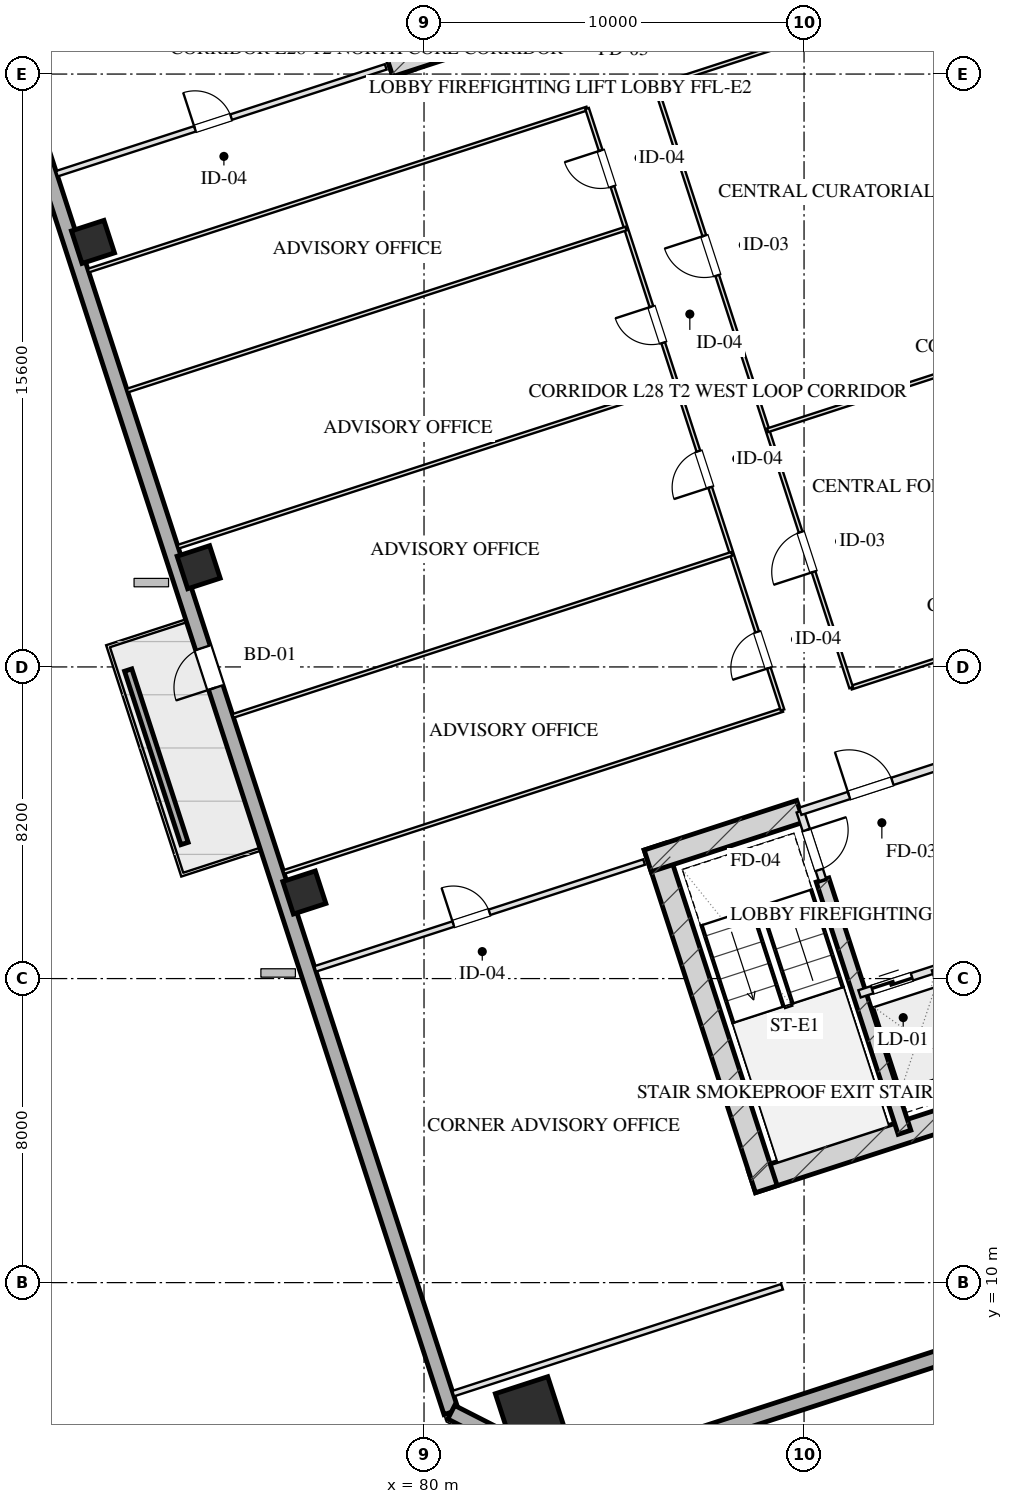
"""IFC4 building model, lengths in metres.
Left out: names, types, materials, properties, quantities, classifications, styles, units other than length and angle.
Written with IfcOpenShell. Run it as: python <this file> out.ifc"""

import sys

from ifc_helpers import new_model, si_unit, direction, frame, frame_2d, origin, origin_2d, place, context, subcontext, project, spatial, rectangle, hollow_rectangle, extrude, element, fill, save


model = new_model("IFC4")
c1 = context("Model", 3, precision=1e-05, world=origin(), true_north=direction((0.0, 1.0)))
c2 = subcontext(c1, "Body", "Model", "MODEL_VIEW")
j1 = project(units=[si_unit("LENGTHUNIT", "METRE"), si_unit("PLANEANGLEUNIT", "RADIAN")], contexts=[c1])
p1 = place(None, origin())
s1 = spatial("IfcSite", under=j1, at=p1, CompositionType="ELEMENT")
p2 = place(p1, origin())
s2 = spatial("IfcBuilding", under=s1, at=p2, CompositionType="ELEMENT")
p3 = place(p2, frame((0.0, 0.0, 110.4)))
s3 = spatial("IfcBuildingStorey", under=s2, at=p3, CompositionType="ELEMENT", Elevation=110.4)
p4 = place(p3, frame((88.63, 12.652, 0.0), z_axis=(0.0, 0.0, 1.0), x_axis=(0.95105714907, 0.309015046886, 0.0)))
e1 = element("IfcWall", 1, at=p4, inside=s3, PredefinedType="SHEAR", context=c2, shape_type="SweptSolid", body=[
    extrude(rectangle(XDim=16.4, YDim=0.6, at=frame_2d((8.2, 0.0))), origin(), (0.0, 0.0, 1.0), 3.45),
])
p5 = place(p3, frame((86.078, 21.475, 0.0), z_axis=(0.0, 0.0, 1.0), x_axis=(0.309017938678, -0.951056209472, 0.0)))
e2 = element("IfcWall", 2, at=p5, inside=s3, PredefinedType="SHEAR", context=c2, shape_type="SweptSolid", body=[
    extrude(rectangle(XDim=9.48, YDim=0.6, at=frame_2d((4.74, 0.0))), origin(), (0.0, 0.0, 1.0), 3.45),
])
p6 = place(p3, frame((90.486, 20.594, 0.0), z_axis=(0.0, 0.0, 1.0), x_axis=(0.309020428229, -0.951055400562, 0.0)))
e3 = element("IfcWall", 3, at=p6, inside=s3, PredefinedType="SHEAR", context=c2, shape_type="SweptSolid", body=[
    extrude(rectangle(XDim=6.98, YDim=0.35, at=frame_2d((3.49, 0.0))), origin(), (0.0, 0.0, 1.0), 3.45),
])
p7 = place(p3, frame((85.886, 21.097, 0.0), z_axis=(0.0, 0.0, 1.0), x_axis=(0.951068073652, 0.308981422225, 0.0)))
e4 = element("IfcWall", 4, at=p7, inside=s3, PredefinedType="SHEAR", context=c2, shape_type="SweptSolid", body=[
    extrude(rectangle(XDim=4.22, YDim=0.6, at=frame_2d((2.11, 0.0))), origin(), (0.0, 0.0, 1.0), 3.45),
])
p8 = place(p3, frame((79.466, 41.828, 0.0), z_axis=(0.0, 0.0, 1.0), x_axis=(-0.309041232772, 0.951048640421, 0.0)))
e5 = element("IfcWall", 5, at=p8, inside=s3, PredefinedType="SHEAR", context=c2, shape_type="SweptSolid", body=[
    extrude(rectangle(XDim=9.48, YDim=0.6, at=frame_2d((4.74, 0.0))), origin(), (0.0, 0.0, 1.0), 3.45),
])
p9 = place(p3, frame((79.087, 42.021, 0.0), z_axis=(0.0, 0.0, 1.0), x_axis=(0.951062550203, 0.3089984233, 0.0)))
e6 = element("IfcWall", 6, at=p9, inside=s3, PredefinedType="SHEAR", context=c2, shape_type="SweptSolid", body=[
    extrude(rectangle(XDim=4.22, YDim=0.6, at=frame_2d((2.11, 0.0))), origin(), (0.0, 0.0, 1.0), 3.45),
])
p10 = place(p3, frame((82.791, 6.612, 0.0), z_axis=(0.0, 0.0, 1.0), x_axis=(0.951056516295, 0.309016994375, 0.0)))
e7 = element("IfcColumn", 7, at=p10, inside=s3, PredefinedType="COLUMN", context=c2, shape_type="SweptSolid", body=[
    extrude(hollow_rectangle(XDim=1.45, YDim=1.45, WallThickness=0.05, at=origin_2d()), origin(), (0.0, 0.0, 1.0), 3.451),
])
for number, where, z_axis, x_axis in (
    (8, (76.851, 20.264, 0.0), (0.0, 0.0, 1.0), (0.951, 0.309, 0.0)),
    (9, (74.07, 28.824, 0.0), (0.0, 0.0, 1.0), (0.951, 0.309, 0.0)),
    (10, (71.289, 37.384, 0.0), (0.0, 0.0, 1.0), (0.951, 0.309, 0.0)),
):
    element("IfcColumn", number, at=place(p3, frame(where, z_axis=z_axis, x_axis=x_axis)), inside=s3, PredefinedType="COLUMN", context=c2, shape_type="SweptSolid", body=[
        extrude(hollow_rectangle(XDim=0.9, YDim=0.9, WallThickness=0.032, at=origin_2d()), origin(), (0.0, 0.0, 1.0), 3.451),
    ])
p11 = place(p3, frame((80.716, 6.59, 0.0), z_axis=(0.0, 0.0, 1.0), x_axis=(-0.309017542002, 0.95105633836, 0.0)))
e11 = element("IfcWall", 11, at=p11, inside=s3, PredefinedType="SOLIDWALL", context=c2, shape_type="SweptSolid", body=[
    extrude(rectangle(XDim=46.4, YDim=0.4, at=frame_2d((23.2, 0.0))), origin(), (0.0, 0.0, 1.0), 2.61),
])
p12 = place(p11, frame((20.05, 0.0, 0.0)))
e12 = element("IfcOpeningElement", 12, at=p12, cuts=e11, PredefinedType="OPENING", context=c2, shape_type="SweptSolid", body=[
    extrude(rectangle(XDim=1.1, YDim=2.15, at=frame_2d((0.55, 1.075))), frame((0.0, 0.21, 0.0), z_axis=(0.0, -1.0, 0.0), x_axis=(1.0, 0.0, 0.0)), (0.0, 0.0, 1.0), 0.42),
])
p13 = place(p3, frame((111.953, 14.005, 0.0), z_axis=(0.0, 0.0, 1.0), x_axis=(-0.95105505922, -0.309021478754, 0.0)))
e13 = element("IfcWall", 13, at=p13, inside=s3, PredefinedType="SOLIDWALL", context=c2, shape_type="SweptSolid", body=[
    extrude(rectangle(XDim=29.4, YDim=0.4, at=frame_2d((14.7, 0.0))), origin(), (0.0, 0.0, 1.0), 2.61),
])
p14 = place(p3, frame((83.992, 4.92, 0.0), z_axis=(0.0, 0.0, 1.0), x_axis=(-0.891001999643, 0.45399937955, 0.0)))
e14 = element("IfcWall", 14, at=p14, inside=s3, PredefinedType="SOLIDWALL", context=c2, shape_type="SweptSolid", body=[
    extrude(rectangle(XDim=3.677, YDim=0.4, at=frame_2d((1.839, 0.0))), origin(), (0.0, 0.0, 1.0), 2.61),
])
p15 = place(p3, frame((73.698, 21.553, 0.0), z_axis=(0.0, 0.0, 1.0), x_axis=(-0.309032019345, 0.951051634255, 0.0)))
e15 = element("IfcWall", 15, at=p15, inside=s3, PredefinedType="PARAPET", context=c2, shape_type="SweptSolid", body=[
    extrude(rectangle(XDim=4.8, YDim=0.2, at=frame_2d((2.4, 0.0))), origin(), (0.0, 0.0, 1.0), 0.75),
])
p16 = place(p3, frame((89.899, 22.401, 0.0), z_axis=(0.0, 0.0, 1.0), x_axis=(0.308932062672, -0.951084108086, 0.0)))
e16 = element("IfcWall", 16, at=p16, inside=s3, PredefinedType="PARTITIONING", context=c2, shape_type="SweptSolid", body=[
    extrude(rectangle(XDim=1.9, YDim=0.2, at=frame_2d((0.95, 0.0))), origin(), (0.0, 0.0, 1.0), 3.175),
])
p17 = place(p16, frame((0.52, 0.0, 0.0)))
e17 = element("IfcOpeningElement", 17, at=p17, cuts=e16, PredefinedType="OPENING", context=c2, shape_type="SweptSolid", body=[
    extrude(rectangle(XDim=1.1, YDim=2.05, at=frame_2d((0.55, 1.025))), frame((0.0, 0.11, 0.0), z_axis=(0.0, -1.0, 0.0), x_axis=(1.0, 0.0, 0.0)), (0.0, 0.0, 1.0), 0.22),
])
p18 = place(p3, frame((89.899, 22.401, 0.0), z_axis=(0.0, 0.0, 1.0), x_axis=(0.951046716504, 0.309047153403, 0.0)))
e18 = element("IfcWall", 18, at=p18, inside=s3, PredefinedType="PARTITIONING", context=c2, shape_type="SweptSolid", body=[
    extrude(rectangle(XDim=3.83, YDim=0.2, at=frame_2d((1.915, 0.0))), origin(), (0.0, 0.0, 1.0), 3.175),
])
p19 = place(p18, frame((1.35, 0.0, 0.0)))
e19 = element("IfcOpeningElement", 19, at=p19, cuts=e18, PredefinedType="OPENING", context=c2, shape_type="SweptSolid", body=[
    extrude(rectangle(XDim=1.2, YDim=2.05, at=frame_2d((0.6, 1.025))), frame((0.0, 0.11, 0.0), z_axis=(0.0, -1.0, 0.0), x_axis=(1.0, 0.0, 0.0)), (0.0, 0.0, 1.0), 0.22),
])
p20 = place(p3, frame((91.46, 17.598, 0.0), z_axis=(0.0, 0.0, 1.0), x_axis=(0.951062257173, 0.308999325213, 0.0)))
e20 = element("IfcWall", 20, at=p20, inside=s3, PredefinedType="PARTITIONING", context=c2, shape_type="SweptSolid", body=[
    extrude(rectangle(XDim=2.1, YDim=0.2, at=frame_2d((1.05, 0.0))), origin(), (0.0, 0.0, 1.0), 3.175),
])
p21 = place(p20, frame((0.35, 0.0, 0.0)))
e21 = element("IfcOpeningElement", 21, at=p21, cuts=e20, PredefinedType="OPENING", context=c2, shape_type="SweptSolid", body=[
    extrude(rectangle(XDim=1.1, YDim=2.05, at=frame_2d((0.55, 1.025))), frame((0.0, 0.11, 0.0), z_axis=(0.0, -1.0, 0.0), x_axis=(1.0, 0.0, 0.0)), (0.0, 0.0, 1.0), 0.22),
])
p22 = place(p3, frame((93.457, 18.247, 0.0), z_axis=(0.0, 0.0, 1.0), x_axis=(0.3089935693, -0.951064127245, 0.0)))
e22 = element("IfcWall", 22, at=p22, inside=s3, PredefinedType="PARTITIONING", context=c2, shape_type="SweptSolid", body=[
    extrude(rectangle(XDim=3.7, YDim=0.2, at=frame_2d((1.85, 0.0))), origin(), (0.0, 0.0, 1.0), 3.175),
])
p23 = place(p3, frame((80.767, 7.079, 0.0), z_axis=(0.0, 0.0, 1.0), x_axis=(0.951057133767, 0.309015093986, 0.0)))
e23 = element("IfcWall", 23, at=p23, inside=s3, PredefinedType="PARTITIONING", context=c2, shape_type="SweptSolid", body=[
    extrude(rectangle(XDim=9.1, YDim=0.15, at=frame_2d((4.55, 0.0))), origin(), (0.0, 0.0, 1.0), 3.175),
])
p24 = place(p3, frame((77.136, 18.254, 0.0), z_axis=(0.0, 0.0, 1.0), x_axis=(0.951057133767, 0.309015093986, 0.0)))
e24 = element("IfcWall", 24, at=p24, inside=s3, PredefinedType="PARTITIONING", context=c2, shape_type="SweptSolid", body=[
    extrude(rectangle(XDim=9.1, YDim=0.15, at=frame_2d((4.55, 0.0))), origin(), (0.0, 0.0, 1.0), 3.175),
])
p25 = place(p24, frame((3.822, 0.0, 0.0)))
e25 = element("IfcOpeningElement", 25, at=p25, cuts=e24, PredefinedType="OPENING", context=c2, shape_type="SweptSolid", body=[
    extrude(rectangle(XDim=1.0, YDim=2.05, at=frame_2d((0.5, 1.025))), frame((0.0, 0.085, 0.0), z_axis=(0.0, -1.0, 0.0), x_axis=(1.0, 0.0, 0.0)), (0.0, 0.0, 1.0), 0.17),
])
p26 = place(p3, frame((70.338, 39.177, 0.0), z_axis=(0.0, 0.0, 1.0), x_axis=(0.951059695568, 0.309007209409, 0.0)))
e26 = element("IfcWall", 26, at=p26, inside=s3, PredefinedType="PARTITIONING", context=c2, shape_type="SweptSolid", body=[
    extrude(rectangle(XDim=9.1, YDim=0.15, at=frame_2d((4.55, 0.0))), origin(), (0.0, 0.0, 1.0), 3.175),
])
p27 = place(p26, frame((3.822, 0.0, 0.0)))
e27 = element("IfcOpeningElement", 27, at=p27, cuts=e26, PredefinedType="OPENING", context=c2, shape_type="SweptSolid", body=[
    extrude(rectangle(XDim=1.0, YDim=2.05, at=frame_2d((0.5, 1.025))), frame((0.0, 0.085, 0.0), z_axis=(0.0, -1.0, 0.0), x_axis=(1.0, 0.0, 0.0)), (0.0, 0.0, 1.0), 0.17),
])
p28 = place(p3, frame((76.308, 20.803, 0.0), z_axis=(0.0, 0.0, 1.0), x_axis=(0.951058377365, 0.309011266531, 0.0)))
e28 = element("IfcWall", 28, at=p28, inside=s3, PredefinedType="MOVABLE", context=c2, shape_type="SweptSolid", body=[
    extrude(rectangle(XDim=13.8, YDim=0.1, at=frame_2d((6.9, 0.0))), origin(), (0.0, 0.0, 1.0), 3.175),
])
p29 = place(p3, frame((91.24, 25.655, 0.0), z_axis=(0.0, 0.0, 1.0), x_axis=(0.951060182336, 0.309005711233, 0.0)))
e29 = element("IfcWall", 29, at=p29, inside=s3, PredefinedType="MOVABLE", context=c2, shape_type="SweptSolid", body=[
    extrude(rectangle(XDim=7.9, YDim=0.1, at=frame_2d((3.95, 0.0))), origin(), (0.0, 0.0, 1.0), 3.175),
])
p30 = place(p3, frame((71.166, 36.629, 0.0), z_axis=(0.0, 0.0, 1.0), x_axis=(0.951056688031, 0.309016465825, 0.0)))
e30 = element("IfcWall", 30, at=p30, inside=s3, PredefinedType="MOVABLE", context=c2, shape_type="SweptSolid", body=[
    extrude(rectangle(XDim=13.8, YDim=0.1, at=frame_2d((6.9, 0.0))), origin(), (0.0, 0.0, 1.0), 3.175),
])
p31 = place(p3, frame((86.097, 41.48, 0.0), z_axis=(0.0, 0.0, 1.0), x_axis=(0.951060182336, 0.309005711233, 0.0)))
e31 = element("IfcWall", 31, at=p31, inside=s3, PredefinedType="MOVABLE", context=c2, shape_type="SweptSolid", body=[
    extrude(rectangle(XDim=7.9, YDim=0.1, at=frame_2d((3.95, 0.0))), origin(), (0.0, 0.0, 1.0), 3.175),
])
p32 = place(p3, frame((89.433, 25.067, 0.0), z_axis=(0.0, 0.0, 1.0), x_axis=(-0.30901773025, 0.951056277195, 0.0)))
e32 = element("IfcWall", 32, at=p32, inside=s3, PredefinedType="MOVABLE", context=c2, shape_type="SweptSolid", body=[
    extrude(rectangle(XDim=16.64, YDim=0.1, at=frame_2d((8.32, 0.0))), origin(), (0.0, 0.0, 1.0), 3.175),
])
p33 = place(p32, frame((1.16, 0.0, 0.0)))
e33 = element("IfcOpeningElement", 33, at=p33, cuts=e32, PredefinedType="OPENING", context=c2, shape_type="SweptSolid", body=[
    extrude(rectangle(XDim=1.0, YDim=2.05, at=frame_2d((0.5, 1.025))), frame((0.0, 0.06, 0.0), z_axis=(0.0, -1.0, 0.0), x_axis=(1.0, 0.0, 0.0)), (0.0, 0.0, 1.0), 0.12),
])
p34 = place(p32, frame((6.16, 0.0, 0.0)))
e34 = element("IfcOpeningElement", 34, at=p34, cuts=e32, PredefinedType="OPENING", context=c2, shape_type="SweptSolid", body=[
    extrude(rectangle(XDim=1.0, YDim=2.05, at=frame_2d((0.5, 1.025))), frame((0.0, 0.06, 0.0), z_axis=(0.0, -1.0, 0.0), x_axis=(1.0, 0.0, 0.0)), (0.0, 0.0, 1.0), 0.12),
])
p35 = place(p32, frame((10.16, 0.0, 0.0)))
e35 = element("IfcOpeningElement", 35, at=p35, cuts=e32, PredefinedType="OPENING", context=c2, shape_type="SweptSolid", body=[
    extrude(rectangle(XDim=1.0, YDim=2.05, at=frame_2d((0.5, 1.025))), frame((0.0, 0.06, 0.0), z_axis=(0.0, -1.0, 0.0), x_axis=(1.0, 0.0, 0.0)), (0.0, 0.0, 1.0), 0.12),
])
p36 = place(p32, frame((14.48, 0.0, 0.0)))
e36 = element("IfcOpeningElement", 36, at=p36, cuts=e32, PredefinedType="OPENING", context=c2, shape_type="SweptSolid", body=[
    extrude(rectangle(XDim=1.0, YDim=2.05, at=frame_2d((0.5, 1.025))), frame((0.0, 0.06, 0.0), z_axis=(0.0, -1.0, 0.0), x_axis=(1.0, 0.0, 0.0)), (0.0, 0.0, 1.0), 0.12),
])
p37 = place(p3, frame((91.24, 25.655, 0.0), z_axis=(0.0, 0.0, 1.0), x_axis=(-0.30901773025, 0.951056277195, 0.0)))
e37 = element("IfcWall", 37, at=p37, inside=s3, PredefinedType="MOVABLE", context=c2, shape_type="SweptSolid", body=[
    extrude(rectangle(XDim=16.64, YDim=0.1, at=frame_2d((8.32, 0.0))), origin(), (0.0, 0.0, 1.0), 3.175),
])
p38 = place(p37, frame((3.204, 0.0, 0.0)))
e38 = element("IfcOpeningElement", 38, at=p38, cuts=e37, PredefinedType="OPENING", context=c2, shape_type="SweptSolid", body=[
    extrude(rectangle(XDim=1.1, YDim=2.05, at=frame_2d((0.55, 1.025))), frame((0.0, 0.06, 0.0), z_axis=(0.0, -1.0, 0.0), x_axis=(1.0, 0.0, 0.0)), (0.0, 0.0, 1.0), 0.12),
])
p39 = place(p37, frame((11.404, 0.0, 0.0)))
e39 = element("IfcOpeningElement", 39, at=p39, cuts=e37, PredefinedType="OPENING", context=c2, shape_type="SweptSolid", body=[
    extrude(rectangle(XDim=1.1, YDim=2.05, at=frame_2d((0.55, 1.025))), frame((0.0, 0.06, 0.0), z_axis=(0.0, -1.0, 0.0), x_axis=(1.0, 0.0, 0.0)), (0.0, 0.0, 1.0), 0.12),
])
p40 = place(p3, frame((89.039, 32.426, 0.0), z_axis=(0.0, 0.0, 1.0), x_axis=(0.951051099951, 0.309033663672, 0.0)))
e40 = element("IfcWall", 40, at=p40, inside=s3, PredefinedType="MOVABLE", context=c2, shape_type="SweptSolid", body=[
    extrude(rectangle(XDim=7.9, YDim=0.1, at=frame_2d((3.95, 0.0))), origin(), (0.0, 0.0, 1.0), 3.175),
])
p41 = place(p3, frame((74.973, 24.912, 0.0), z_axis=(0.0, 0.0, 1.0), x_axis=(0.951058377365, 0.309011266531, 0.0)))
e41 = element("IfcWall", 41, at=p41, inside=s3, PredefinedType="MOVABLE", context=c2, shape_type="SweptSolid", body=[
    extrude(rectangle(XDim=13.8, YDim=0.1, at=frame_2d((6.9, 0.0))), origin(), (0.0, 0.0, 1.0), 3.175),
])
for number, where, z_axis, x_axis in (
    (42, (73.527, 29.363, 0.0), (0.0, 0.0, 1.0), (0.951, 0.309, 0.0)),
    (43, (72.192, 33.471, 0.0), (0.0, 0.0, 1.0), (0.951, 0.309, 0.0)),
):
    element("IfcWall", number, at=place(p3, frame(where, z_axis=z_axis, x_axis=x_axis)), inside=s3, PredefinedType="MOVABLE", context=c2, shape_type="SweptSolid", body=[
        extrude(rectangle(XDim=13.8, YDim=0.1, at=frame_2d((6.9, 0.0))), origin(), (0.0, 0.0, 1.0), 3.175),
    ])
p42 = place(p12, origin())
e44 = element("IfcDoor", 44, at=p42, inside=s3, OperationType="SINGLE_SWING_LEFT", PredefinedType="DOOR", context=c2, shape_type="SweptSolid", body=[
    extrude(rectangle(XDim=1.1, YDim=2.15, at=frame_2d((0.55, 1.075))), frame((0.0, 0.025, 0.0), z_axis=(0.0, -1.0, 0.0), x_axis=(1.0, 0.0, 0.0)), (0.0, 0.0, 1.0), 0.05),
])
fill(e12, e44)
p43 = place(p17, origin())
e45 = element("IfcDoor", 45, at=p43, inside=s3, OperationType="SINGLE_SWING_LEFT", PredefinedType="DOOR", context=c2, shape_type="SweptSolid", body=[
    extrude(rectangle(XDim=1.1, YDim=2.05, at=frame_2d((0.55, 1.025))), frame((0.0, 0.025, 0.0), z_axis=(0.0, -1.0, 0.0), x_axis=(1.0, 0.0, 0.0)), (0.0, 0.0, 1.0), 0.05),
])
fill(e17, e45)
p44 = place(p19, origin())
e46 = element("IfcDoor", 46, at=p44, inside=s3, OperationType="SINGLE_SWING_LEFT", PredefinedType="DOOR", context=c2, shape_type="SweptSolid", body=[
    extrude(rectangle(XDim=1.2, YDim=2.05, at=frame_2d((0.6, 1.025))), frame((0.0, 0.025, 0.0), z_axis=(0.0, -1.0, 0.0), x_axis=(1.0, 0.0, 0.0)), (0.0, 0.0, 1.0), 0.05),
])
fill(e19, e46)
p45 = place(p21, origin())
e47 = element("IfcDoor", 47, at=p45, inside=s3, OperationType="DOUBLE_DOOR_SLIDING", PredefinedType="DOOR", context=c2, shape_type="SweptSolid", body=[
    extrude(rectangle(XDim=1.1, YDim=2.05, at=frame_2d((0.55, 1.025))), frame((0.0, 0.025, 0.0), z_axis=(0.0, -1.0, 0.0), x_axis=(1.0, 0.0, 0.0)), (0.0, 0.0, 1.0), 0.05),
])
fill(e21, e47)
p46 = place(p25, origin())
e48 = element("IfcDoor", 48, at=p46, inside=s3, OperationType="SINGLE_SWING_LEFT", PredefinedType="DOOR", context=c2, shape_type="SweptSolid", body=[
    extrude(rectangle(XDim=1.0, YDim=2.05, at=frame_2d((0.5, 1.025))), frame((0.0, 0.025, 0.0), z_axis=(0.0, -1.0, 0.0), x_axis=(1.0, 0.0, 0.0)), (0.0, 0.0, 1.0), 0.05),
])
fill(e25, e48)
p47 = place(p27, origin())
e49 = element("IfcDoor", 49, at=p47, inside=s3, OperationType="SINGLE_SWING_LEFT", PredefinedType="DOOR", context=c2, shape_type="SweptSolid", body=[
    extrude(rectangle(XDim=1.0, YDim=2.05, at=frame_2d((0.5, 1.025))), frame((0.0, 0.025, 0.0), z_axis=(0.0, -1.0, 0.0), x_axis=(1.0, 0.0, 0.0)), (0.0, 0.0, 1.0), 0.05),
])
fill(e27, e49)
p48 = place(p33, origin())
e50 = element("IfcDoor", 50, at=p48, inside=s3, OperationType="SINGLE_SWING_LEFT", PredefinedType="DOOR", context=c2, shape_type="SweptSolid", body=[
    extrude(rectangle(XDim=1.0, YDim=2.05, at=frame_2d((0.5, 1.025))), frame((0.0, 0.025, 0.0), z_axis=(0.0, -1.0, 0.0), x_axis=(1.0, 0.0, 0.0)), (0.0, 0.0, 1.0), 0.05),
])
fill(e33, e50)
p49 = place(p34, origin())
e51 = element("IfcDoor", 51, at=p49, inside=s3, OperationType="SINGLE_SWING_LEFT", PredefinedType="DOOR", context=c2, shape_type="SweptSolid", body=[
    extrude(rectangle(XDim=1.0, YDim=2.05, at=frame_2d((0.5, 1.025))), frame((0.0, 0.025, 0.0), z_axis=(0.0, -1.0, 0.0), x_axis=(1.0, 0.0, 0.0)), (0.0, 0.0, 1.0), 0.05),
])
fill(e34, e51)
p50 = place(p35, origin())
e52 = element("IfcDoor", 52, at=p50, inside=s3, OperationType="SINGLE_SWING_RIGHT", PredefinedType="DOOR", context=c2, shape_type="SweptSolid", body=[
    extrude(rectangle(XDim=1.0, YDim=2.05, at=frame_2d((0.5, 1.025))), frame((0.0, 0.025, 0.0), z_axis=(0.0, -1.0, 0.0), x_axis=(1.0, 0.0, 0.0)), (0.0, 0.0, 1.0), 0.05),
])
fill(e35, e52)
p51 = place(p36, origin())
e53 = element("IfcDoor", 53, at=p51, inside=s3, OperationType="SINGLE_SWING_RIGHT", PredefinedType="DOOR", context=c2, shape_type="SweptSolid", body=[
    extrude(rectangle(XDim=1.0, YDim=2.05, at=frame_2d((0.5, 1.025))), frame((0.0, 0.025, 0.0), z_axis=(0.0, -1.0, 0.0), x_axis=(1.0, 0.0, 0.0)), (0.0, 0.0, 1.0), 0.05),
])
fill(e36, e53)
p52 = place(p38, origin())
e54 = element("IfcDoor", 54, at=p52, inside=s3, OperationType="SINGLE_SWING_LEFT", PredefinedType="DOOR", context=c2, shape_type="SweptSolid", body=[
    extrude(rectangle(XDim=1.1, YDim=2.05, at=frame_2d((0.55, 1.025))), frame((0.0, 0.025, 0.0), z_axis=(0.0, -1.0, 0.0), x_axis=(1.0, 0.0, 0.0)), (0.0, 0.0, 1.0), 0.05),
])
fill(e38, e54)
p53 = place(p39, origin())
e55 = element("IfcDoor", 55, at=p53, inside=s3, OperationType="SINGLE_SWING_RIGHT", PredefinedType="DOOR", context=c2, shape_type="SweptSolid", body=[
    extrude(rectangle(XDim=1.1, YDim=2.05, at=frame_2d((0.55, 1.025))), frame((0.0, 0.025, 0.0), z_axis=(0.0, -1.0, 0.0), x_axis=(1.0, 0.0, 0.0)), (0.0, 0.0, 1.0), 0.05),
])
fill(e39, e55)
save(model, sys.argv[1])
